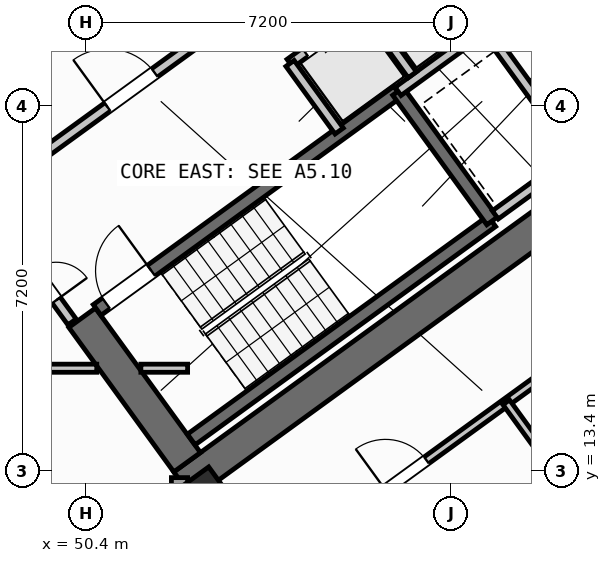
"""IFC4 building model, lengths in metres.
Left out: names, types, materials, properties, quantities, classifications, styles, units other than length and angle.
Written with IfcOpenShell. Run it as: python <this file> out.ifc"""

import sys

from ifc_helpers import new_model, si_unit, direction, frame, frame_2d, origin, origin_2d, place, context, subcontext, project, spatial, rectangle, hollow_rectangle, extrude, source, transform, mapped, element, fill, save


model = new_model("IFC4")
c1 = context("Model", 3, precision=1e-05, world=origin(), true_north=direction((0.0, 1.0)))
c2 = subcontext(c1, "Body", "Model", "MODEL_VIEW")
j1 = project(units=[si_unit("LENGTHUNIT", "METRE"), si_unit("PLANEANGLEUNIT", "RADIAN")], contexts=[c1])
p1 = place(None, origin())
s1 = spatial("IfcSite", under=j1, at=p1, CompositionType="ELEMENT")
p2 = place(p1, origin())
s2 = spatial("IfcBuilding", under=s1, at=p2, CompositionType="ELEMENT")
p3 = place(p2, frame((0.0, 0.0, 38.4)))
s3 = spatial("IfcBuildingStorey", under=s2, at=p3, CompositionType="ELEMENT", Elevation=38.4)
p4 = place(p3, frame((52.318, 13.11, 0.0), z_axis=(0.0, 0.0, 1.0), x_axis=(0.809019445368, 0.587781878776, 0.0)))
e1 = element("IfcWall", 1, at=p4, inside=s3, PredefinedType="SHEAR", context=c2, shape_type="SweptSolid", body=[
    extrude(rectangle(XDim=12.44, YDim=0.65, at=frame_2d((6.22, 0.0))), origin(), (0.0, 0.0, 1.0), 3.35),
])
p5 = place(p3, frame((52.39, 13.564, 0.0), z_axis=(0.0, 0.0, 1.0), x_axis=(-0.58779688989, 0.809008539037, 0.0)))
e2 = element("IfcWall", 2, at=p5, inside=s3, PredefinedType="SHEAR", context=c2, shape_type="SweptSolid", body=[
    extrude(rectangle(XDim=3.525, YDim=0.65, at=frame_2d((1.763, 0.0))), origin(), (0.0, 0.0, 1.0), 3.35),
])
m1 = source(origin(), c2, "Body", "SweptSolid", [
    extrude(hollow_rectangle(XDim=1.0, YDim=1.0, WallThickness=0.04, at=origin_2d()), origin(), (0.0, 0.0, 1.0), 3.6),
])
p6 = place(p3, frame((52.705, 12.773, 0.0), z_axis=(0.0, 0.0, 1.0), x_axis=(0.809016994375, 0.587785252292, 0.0)))
e3 = element("IfcColumn", 3, at=p6, inside=s3, PredefinedType="COLUMN", context=c2, shape_type="MappedRepresentation", body=[
    mapped(m1, transform((0.0, 0.0, 0.0), scale=1.0)),
])
p7 = place(p3, frame((58.455, 35.484, 0.0), z_axis=(0.0, 0.0, 1.0), x_axis=(0.587783625747, -0.809018176127, 0.0)))
e4 = element("IfcWall", 4, at=p7, inside=s3, PredefinedType="STANDARD", context=c2, shape_type="SweptSolid", body=[
    extrude(rectangle(XDim=21.587, YDim=0.32, at=frame_2d((10.794, 0.0))), origin(), (0.0, 0.0, 1.0), 2.725),
])
p8 = place(p7, frame((1.529, 0.0, 0.85)))
e5 = element("IfcOpeningElement", 5, at=p8, cuts=e4, PredefinedType="OPENING", context=c2, shape_type="SweptSolid", body=[
    extrude(rectangle(XDim=1.8, YDim=1.5, at=frame_2d((0.9, 0.75))), frame((0.0, 0.17, 0.0), z_axis=(0.0, -1.0, 0.0), x_axis=(1.0, 0.0, 0.0)), (0.0, 0.0, 1.0), 0.34),
])
p9 = place(p7, frame((10.444, 0.0, 0.85)))
e6 = element("IfcOpeningElement", 6, at=p9, cuts=e4, PredefinedType="OPENING", context=c2, shape_type="SweptSolid", body=[
    extrude(rectangle(XDim=1.8, YDim=1.5, at=frame_2d((0.9, 0.75))), frame((0.0, 0.17, 0.0), z_axis=(0.0, -1.0, 0.0), x_axis=(1.0, 0.0, 0.0)), (0.0, 0.0, 1.0), 0.34),
])
p10 = place(p7, frame((17.595, 0.0, 0.85)))
e7 = element("IfcOpeningElement", 7, at=p10, cuts=e4, PredefinedType="OPENING", context=c2, shape_type="SweptSolid", body=[
    extrude(rectangle(XDim=1.5, YDim=1.5, at=frame_2d((0.75, 0.75))), frame((0.0, 0.17, 0.0), z_axis=(0.0, -1.0, 0.0), x_axis=(1.0, 0.0, 0.0)), (0.0, 0.0, 1.0), 0.34),
])
p11 = place(p3, frame((71.098, 17.731, 0.0), z_axis=(0.0, 0.0, 1.0), x_axis=(-0.809021120468, -0.587779573171, 0.0)))
e8 = element("IfcWall", 8, at=p11, inside=s3, PredefinedType="STANDARD", context=c2, shape_type="SweptSolid", body=[
    extrude(rectangle(XDim=17.588, YDim=0.32, at=frame_2d((8.794, 0.0))), origin(), (0.0, 0.0, 1.0), 3.35),
])
p12 = place(p11, frame((1.624, 0.0, 0.0)))
e9 = element("IfcOpeningElement", 9, at=p12, cuts=e8, PredefinedType="OPENING", context=c2, shape_type="SweptSolid", body=[
    extrude(rectangle(XDim=1.05, YDim=2.15, at=frame_2d((0.525, 1.075))), frame((0.0, 0.17, 0.0), z_axis=(0.0, -1.0, 0.0), x_axis=(1.0, 0.0, 0.0)), (0.0, 0.0, 1.0), 0.34),
])
p13 = place(p11, frame((4.104, 0.0, 1.0)))
e10 = element("IfcOpeningElement", 10, at=p13, cuts=e8, PredefinedType="OPENING", context=c2, shape_type="SweptSolid", body=[
    extrude(rectangle(XDim=0.9, YDim=1.25, at=frame_2d((0.45, 0.625))), frame((0.0, 0.17, 0.0), z_axis=(0.0, -1.0, 0.0), x_axis=(1.0, 0.0, 0.0)), (0.0, 0.0, 1.0), 0.34),
])
p14 = place(p11, frame((7.879, 0.0, 0.85)))
e11 = element("IfcOpeningElement", 11, at=p14, cuts=e8, PredefinedType="OPENING", context=c2, shape_type="SweptSolid", body=[
    extrude(rectangle(XDim=1.8, YDim=1.5, at=frame_2d((0.9, 0.75))), frame((0.0, 0.17, 0.0), z_axis=(0.0, -1.0, 0.0), x_axis=(1.0, 0.0, 0.0)), (0.0, 0.0, 1.0), 0.34),
])
p15 = place(p11, frame((13.529, 0.0, 0.85)))
e12 = element("IfcOpeningElement", 12, at=p15, cuts=e8, PredefinedType="OPENING", context=c2, shape_type="SweptSolid", body=[
    extrude(rectangle(XDim=1.5, YDim=1.5, at=frame_2d((0.75, 0.75))), frame((0.0, 0.17, 0.0), z_axis=(0.0, -1.0, 0.0), x_axis=(1.0, 0.0, 0.0)), (0.0, 0.0, 1.0), 0.34),
])
p16 = place(p3, frame((52.24, 13.261, 0.0), z_axis=(0.0, 0.0, 1.0), x_axis=(0.0, -1.0, 0.0)))
e13 = element("IfcWall", 13, at=p16, inside=s3, PredefinedType="STANDARD", context=c2, shape_type="SweptSolid", body=[
    extrude(rectangle(XDim=9.795, YDim=0.32, at=frame_2d((4.897, 0.0))), origin(), (0.0, 0.0, 1.0), 3.35),
])
p17 = place(p16, frame((2.199, 0.0, 0.8)))
e14 = element("IfcOpeningElement", 14, at=p17, cuts=e13, PredefinedType="OPENING", context=c2, shape_type="SweptSolid", body=[
    extrude(rectangle(XDim=2.1, YDim=1.55, at=frame_2d((1.05, 0.775))), frame((0.0, 0.17, 0.0), z_axis=(0.0, -1.0, 0.0), x_axis=(1.0, 0.0, 0.0)), (0.0, 0.0, 1.0), 0.34),
])
p18 = place(p16, frame((6.88, 0.0, 0.85)))
e15 = element("IfcOpeningElement", 15, at=p18, cuts=e13, PredefinedType="OPENING", context=c2, shape_type="SweptSolid", body=[
    extrude(rectangle(XDim=1.8, YDim=1.5, at=frame_2d((0.9, 0.75))), frame((0.0, 0.17, 0.0), z_axis=(0.0, -1.0, 0.0), x_axis=(1.0, 0.0, 0.0)), (0.0, 0.0, 1.0), 0.34),
])
p19 = place(p3, frame((52.472, 14.013, 0.0), z_axis=(0.0, 0.0, 1.0), x_axis=(0.809028366311, 0.587769599847, 0.0)))
e16 = element("IfcWall", 16, at=p19, inside=s3, PredefinedType="SHEAR", context=c2, shape_type="SweptSolid", body=[
    extrude(rectangle(XDim=7.33, YDim=0.26, at=frame_2d((3.665, 0.0))), origin(), (0.0, 0.0, 1.0), 3.35),
])
p20 = place(p3, frame((50.615, 16.57, 0.0), z_axis=(0.0, 0.0, 1.0), x_axis=(0.809028366311, 0.587769599847, 0.0)))
e17 = element("IfcWall", 17, at=p20, inside=s3, PredefinedType="SHEAR", context=c2, shape_type="SweptSolid", body=[
    extrude(rectangle(XDim=7.33, YDim=0.26, at=frame_2d((3.665, 0.0))), origin(), (0.0, 0.0, 1.0), 3.35),
])
p21 = place(p20, frame((0.22, 0.0, 0.0)))
e18 = element("IfcOpeningElement", 18, at=p21, cuts=e17, PredefinedType="OPENING", context=c2, shape_type="SweptSolid", body=[
    extrude(rectangle(XDim=1.1, YDim=2.1, at=frame_2d((0.55, 1.05))), frame((0.0, 0.14, 0.0), z_axis=(0.0, -1.0, 0.0), x_axis=(1.0, 0.0, 0.0)), (0.0, 0.0, 1.0), 0.28),
])
p22 = place(p3, frame((58.41, 18.327, 0.0), z_axis=(0.0, 0.0, 1.0), x_axis=(-0.58776738483, 0.809029975545, 0.0)))
e19 = element("IfcWall", 19, at=p22, inside=s3, PredefinedType="SHEAR", context=c2, shape_type="SweptSolid", body=[
    extrude(rectangle(XDim=3.16, YDim=0.26, at=frame_2d((1.58, 0.0))), origin(), (0.0, 0.0, 1.0), 3.35),
])
p23 = place(p3, frame((47.106, 21.437, 0.0), z_axis=(0.0, 0.0, 1.0), x_axis=(0.809012514015, 0.58779141893, 0.0)))
e20 = element("IfcWall", 20, at=p23, inside=s3, PredefinedType="STANDARD", context=c2, shape_type="SweptSolid", body=[
    extrude(rectangle(XDim=3.398, YDim=0.2, at=frame_2d((1.699, 0.0))), origin(), (0.0, 0.0, 1.0), 3.34),
])
p24 = place(p23, frame((0.408, 0.0, 0.0)))
e21 = element("IfcOpeningElement", 21, at=p24, cuts=e20, PredefinedType="OPENING", context=c2, shape_type="SweptSolid", body=[
    extrude(rectangle(XDim=1.3, YDim=2.2, at=frame_2d((0.65, 1.1))), frame((0.0, 0.11, 0.0), z_axis=(0.0, -1.0, 0.0), x_axis=(1.0, 0.0, 0.0)), (0.0, 0.0, 1.0), 0.22),
])
p25 = place(p3, frame((48.799, 19.107, 0.0), z_axis=(0.0, 0.0, 1.0), x_axis=(0.809012959416, 0.587790805897, 0.0)))
e22 = element("IfcWall", 22, at=p25, inside=s3, PredefinedType="STANDARD", context=c2, shape_type="SweptSolid", body=[
    extrude(rectangle(XDim=5.718, YDim=0.2, at=frame_2d((2.859, 0.0))), origin(), (0.0, 0.0, 1.0), 3.34),
])
p26 = place(p25, frame((2.498, 0.0, 0.0)))
e23 = element("IfcOpeningElement", 23, at=p26, cuts=e22, PredefinedType="OPENING", context=c2, shape_type="SweptSolid", body=[
    extrude(rectangle(XDim=1.15, YDim=2.1, at=frame_2d((0.575, 1.05))), frame((0.0, 0.11, 0.0), z_axis=(0.0, -1.0, 0.0), x_axis=(1.0, 0.0, 0.0)), (0.0, 0.0, 1.0), 0.22),
])
p27 = place(p3, frame((56.553, 20.884, 0.0), z_axis=(0.0, 0.0, 1.0), x_axis=(0.809035789462, 0.587759382205, 0.0)))
e24 = element("IfcWall", 24, at=p27, inside=s3, PredefinedType="STANDARD", context=c2, shape_type="SweptSolid", body=[
    extrude(rectangle(XDim=3.768, YDim=0.2, at=frame_2d((1.884, 0.0))), origin(), (0.0, 0.0, 1.0), 3.34),
])
p28 = place(p27, frame((2.65, 0.0, 0.0)))
e25 = element("IfcOpeningElement", 25, at=p28, cuts=e24, PredefinedType="OPENING", context=c2, shape_type="SweptSolid", body=[
    extrude(rectangle(XDim=0.86, YDim=2.05, at=frame_2d((0.43, 1.025))), frame((0.0, 0.11, 0.0), z_axis=(0.0, -1.0, 0.0), x_axis=(1.0, 0.0, 0.0)), (0.0, 0.0, 1.0), 0.22),
])
p29 = place(p3, frame((54.421, 21.436, 0.0), z_axis=(0.0, 0.0, 1.0), x_axis=(0.809013710463, 0.587789772183, 0.0)))
e26 = element("IfcWall", 26, at=p29, inside=s3, PredefinedType="STANDARD", context=c2, shape_type="SweptSolid", body=[
    extrude(rectangle(XDim=5.36, YDim=0.2, at=frame_2d((2.68, 0.0))), origin(), (0.0, 0.0, 1.0), 3.34),
])
p30 = place(p29, frame((0.37, 0.0, 0.0)))
e27 = element("IfcOpeningElement", 27, at=p30, cuts=e26, PredefinedType="OPENING", context=c2, shape_type="SweptSolid", body=[
    extrude(rectangle(XDim=1.1, YDim=2.15, at=frame_2d((0.55, 1.075))), frame((0.0, 0.11, 0.0), z_axis=(0.0, -1.0, 0.0), x_axis=(1.0, 0.0, 0.0)), (0.0, 0.0, 1.0), 0.22),
])
p31 = place(p29, frame((2.17, 0.0, 0.0)))
e28 = element("IfcOpeningElement", 28, at=p31, cuts=e26, PredefinedType="OPENING", context=c2, shape_type="SweptSolid", body=[
    extrude(rectangle(XDim=1.1, YDim=2.15, at=frame_2d((0.55, 1.075))), frame((0.0, 0.11, 0.0), z_axis=(0.0, -1.0, 0.0), x_axis=(1.0, 0.0, 0.0)), (0.0, 0.0, 1.0), 0.22),
])
p32 = place(p29, frame((3.97, 0.0, 0.0)))
e29 = element("IfcOpeningElement", 29, at=p32, cuts=e26, PredefinedType="OPENING", context=c2, shape_type="SweptSolid", body=[
    extrude(rectangle(XDim=1.1, YDim=2.15, at=frame_2d((0.55, 1.075))), frame((0.0, 0.11, 0.0), z_axis=(0.0, -1.0, 0.0), x_axis=(1.0, 0.0, 0.0)), (0.0, 0.0, 1.0), 0.22),
])
p33 = place(p3, frame((55.391, 20.102, 0.0), z_axis=(0.0, 0.0, 1.0), x_axis=(-0.58778447739, 0.809017557374, 0.0)))
e30 = element("IfcWall", 30, at=p33, inside=s3, PredefinedType="STANDARD", context=c2, shape_type="SweptSolid", body=[
    extrude(rectangle(XDim=1.65, YDim=0.2, at=frame_2d((0.825, 0.0))), origin(), (0.0, 0.0, 1.0), 3.34),
])
p34 = place(p3, frame((56.834, 21.212, 0.0), z_axis=(0.0, 0.0, 1.0), x_axis=(-0.58776738483, 0.809029975545, 0.0)))
e31 = element("IfcWall", 31, at=p34, inside=s3, PredefinedType="STANDARD", context=c2, shape_type="SweptSolid", body=[
    extrude(rectangle(XDim=1.58, YDim=0.2, at=frame_2d((0.79, 0.0))), origin(), (0.0, 0.0, 1.0), 3.34),
])
p35 = place(p3, frame((60.067, 19.655, 0.0), z_axis=(0.0, 0.0, 1.0), x_axis=(-0.587800520745, 0.809005900975, 0.0)))
e32 = element("IfcWall", 32, at=p35, inside=s3, PredefinedType="STANDARD", context=c2, shape_type="SweptSolid", body=[
    extrude(rectangle(XDim=2.66, YDim=0.2, at=frame_2d((1.33, 0.0))), origin(), (0.0, 0.0, 1.0), 3.34),
])
p36 = place(p3, frame((58.472, 18.447, 0.0), z_axis=(0.0, 0.0, 1.0), x_axis=(0.809022487728, 0.587777691266, 0.0)))
e33 = element("IfcWall", 33, at=p36, inside=s3, PredefinedType="STANDARD", context=c2, shape_type="SweptSolid", body=[
    extrude(rectangle(XDim=3.648, YDim=0.2, at=frame_2d((1.824, 0.0))), origin(), (0.0, 0.0, 1.0), 3.34),
])
p37 = place(p3, frame((35.296, 15.42, 0.0), z_axis=(0.0, 0.0, 1.0), x_axis=(1.0, 0.0, 0.0)))
e34 = element("IfcWall", 34, at=p37, inside=s3, PredefinedType="PARTITIONING", context=c2, shape_type="SweptSolid", body=[
    extrude(rectangle(XDim=15.311, YDim=0.16, at=frame_2d((7.655, 0.0))), origin(), (0.0, 0.0, 1.0), 3.34),
])
p38 = place(p37, frame((0.91, 0.0, 0.0)))
e35 = element("IfcOpeningElement", 35, at=p38, cuts=e34, PredefinedType="OPENING", context=c2, shape_type="SweptSolid", body=[
    extrude(rectangle(XDim=1.0, YDim=2.1, at=frame_2d((0.5, 1.05))), frame((0.0, 0.09, 0.0), z_axis=(0.0, -1.0, 0.0), x_axis=(1.0, 0.0, 0.0)), (0.0, 0.0, 1.0), 0.18),
])
p39 = place(p37, frame((8.74, 0.0, 0.0)))
e36 = element("IfcOpeningElement", 36, at=p39, cuts=e34, PredefinedType="OPENING", context=c2, shape_type="SweptSolid", body=[
    extrude(rectangle(XDim=1.0, YDim=2.1, at=frame_2d((0.5, 1.05))), frame((0.0, 0.09, 0.0), z_axis=(0.0, -1.0, 0.0), x_axis=(1.0, 0.0, 0.0)), (0.0, 0.0, 1.0), 0.18),
])
p40 = place(p3, frame((51.477, 15.42, 0.0), z_axis=(0.0, 0.0, 1.0), x_axis=(1.0, 0.0, 0.0)))
e37 = element("IfcWall", 37, at=p40, inside=s3, PredefinedType="PARTITIONING", context=c2, shape_type="SweptSolid", body=[
    extrude(rectangle(XDim=0.923, YDim=0.16, at=frame_2d((0.461, 0.0))), origin(), (0.0, 0.0, 1.0), 3.34),
])
p41 = place(p3, frame((50.119, 16.333, 0.0), z_axis=(0.0, 0.0, 1.0), x_axis=(-0.587749856981, 0.809042709391, 0.0)))
e38 = element("IfcWall", 38, at=p41, inside=s3, PredefinedType="STANDARD", context=c2, shape_type="SweptSolid", body=[
    extrude(rectangle(XDim=2.96, YDim=0.2, at=frame_2d((1.48, 0.0))), origin(), (0.0, 0.0, 1.0), 3.34),
])
p42 = place(p41, frame((0.53, 0.0, 0.0)))
e39 = element("IfcOpeningElement", 39, at=p42, cuts=e38, PredefinedType="OPENING", context=c2, shape_type="SweptSolid", body=[
    extrude(rectangle(XDim=1.5, YDim=2.15, at=frame_2d((0.75, 1.075))), frame((0.0, 0.11, 0.0), z_axis=(0.0, -1.0, 0.0), x_axis=(1.0, 0.0, 0.0)), (0.0, 0.0, 1.0), 0.22),
])
p43 = place(p3, frame((53.705, 11.126, 0.0), z_axis=(0.0, 0.0, 1.0), x_axis=(0.809014504436, 0.587788679384, 0.0)))
e40 = element("IfcWall", 40, at=p43, inside=s3, PredefinedType="PARTITIONING", context=c2, shape_type="SweptSolid", body=[
    extrude(rectangle(XDim=14.67, YDim=0.16, at=frame_2d((7.335, 0.0))), origin(), (0.0, 0.0, 1.0), 3.34),
])
p44 = place(p43, frame((3.215, 0.0, 0.0)))
e41 = element("IfcOpeningElement", 41, at=p44, cuts=e40, PredefinedType="OPENING", context=c2, shape_type="SweptSolid", body=[
    extrude(rectangle(XDim=1.0, YDim=2.1, at=frame_2d((0.5, 1.05))), frame((0.0, 0.09, 0.0), z_axis=(0.0, -1.0, 0.0), x_axis=(1.0, 0.0, 0.0)), (0.0, 0.0, 1.0), 0.18),
])
p45 = place(p43, frame((9.915, 0.0, 0.0)))
e42 = element("IfcOpeningElement", 42, at=p45, cuts=e40, PredefinedType="OPENING", context=c2, shape_type="SweptSolid", body=[
    extrude(rectangle(XDim=1.0, YDim=2.1, at=frame_2d((0.5, 1.05))), frame((0.0, 0.09, 0.0), z_axis=(0.0, -1.0, 0.0), x_axis=(1.0, 0.0, 0.0)), (0.0, 0.0, 1.0), 0.18),
])
p46 = place(p3, frame((61.539, 10.823, 0.0), z_axis=(0.0, 0.0, 1.0), x_axis=(-0.587785532001, 0.809016791155, 0.0)))
e43 = element("IfcWall", 43, at=p46, inside=s3, PredefinedType="PARTITIONING", context=c2, shape_type="SweptSolid", body=[
    extrude(rectangle(XDim=4.85, YDim=0.16, at=frame_2d((2.425, 0.0))), origin(), (0.0, 0.0, 1.0), 3.34),
])
m2 = source(origin(), c2, "Body", "SweptSolid", [
    extrude(rectangle(XDim=1.1, YDim=2.1, at=frame_2d((0.55, 1.05))), frame((0.0, 0.025, 0.0), z_axis=(0.0, -1.0, 0.0), x_axis=(1.0, 0.0, 0.0)), (0.0, 0.0, 1.0), 0.05),
])
p47 = place(p21, origin())
e44 = element("IfcDoor", 44, at=p47, inside=s3, OperationType="SINGLE_SWING_RIGHT", PredefinedType="DOOR", context=c2, shape_type="MappedRepresentation", body=[
    mapped(m2, transform((0.0, 0.0, 0.0), scale=1.0)),
])
fill(e18, e44)
m3 = source(origin(), c2, "Body", "SweptSolid", [
    extrude(rectangle(XDim=1.15, YDim=2.1, at=frame_2d((0.575, 1.05))), frame((0.0, 0.025, 0.0), z_axis=(0.0, -1.0, 0.0), x_axis=(1.0, 0.0, 0.0)), (0.0, 0.0, 1.0), 0.05),
])
p48 = place(p26, origin())
e45 = element("IfcDoor", 45, at=p48, inside=s3, OperationType="SINGLE_SWING_LEFT", PredefinedType="DOOR", context=c2, shape_type="MappedRepresentation", body=[
    mapped(m3, transform((0.0, 0.0, 0.0), scale=1.0)),
])
fill(e23, e45)
m4 = source(origin(), c2, "Body", "SweptSolid", [
    extrude(rectangle(XDim=1.1, YDim=2.15, at=frame_2d((0.55, 1.075))), frame((0.0, 0.025, 0.0), z_axis=(0.0, -1.0, 0.0), x_axis=(1.0, 0.0, 0.0)), (0.0, 0.0, 1.0), 0.05),
])
p49 = place(p30, origin())
e46 = element("IfcDoor", 46, at=p49, inside=s3, OperationType="DOUBLE_DOOR_SLIDING", PredefinedType="DOOR", context=c2, shape_type="MappedRepresentation", body=[
    mapped(m4, transform((0.0, 0.0, 0.0), scale=1.0)),
])
fill(e27, e46)
m5 = source(origin(), c2, "Body", "SweptSolid", [
    extrude(rectangle(XDim=1.5, YDim=2.15, at=frame_2d((0.75, 1.075))), frame((0.0, 0.025, 0.0), z_axis=(0.0, -1.0, 0.0), x_axis=(1.0, 0.0, 0.0)), (0.0, 0.0, 1.0), 0.05),
])
p50 = place(p42, frame((1.5, 0.0, 0.0), z_axis=(0.0, 0.0, 1.0), x_axis=(-1.0, 0.0, 0.0)))
e47 = element("IfcDoor", 47, at=p50, inside=s3, OperationType="DOUBLE_DOOR_SINGLE_SWING", PredefinedType="DOOR", context=c2, shape_type="MappedRepresentation", body=[
    mapped(m5, transform((0.0, 0.0, 0.0), scale=1.0)),
])
fill(e39, e47)
m6 = source(origin(), c2, "Body", "SweptSolid", [
    extrude(rectangle(XDim=1.0, YDim=2.1, at=frame_2d((0.5, 1.05))), frame((0.0, 0.025, 0.0), z_axis=(0.0, -1.0, 0.0), x_axis=(1.0, 0.0, 0.0)), (0.0, 0.0, 1.0), 0.05),
])
p51 = place(p44, origin())
e48 = element("IfcDoor", 48, at=p51, inside=s3, OperationType="SINGLE_SWING_LEFT", PredefinedType="DOOR", context=c2, shape_type="MappedRepresentation", body=[
    mapped(m6, transform((0.0, 0.0, 0.0), scale=1.0)),
])
fill(e41, e48)
save(model, sys.argv[1])
